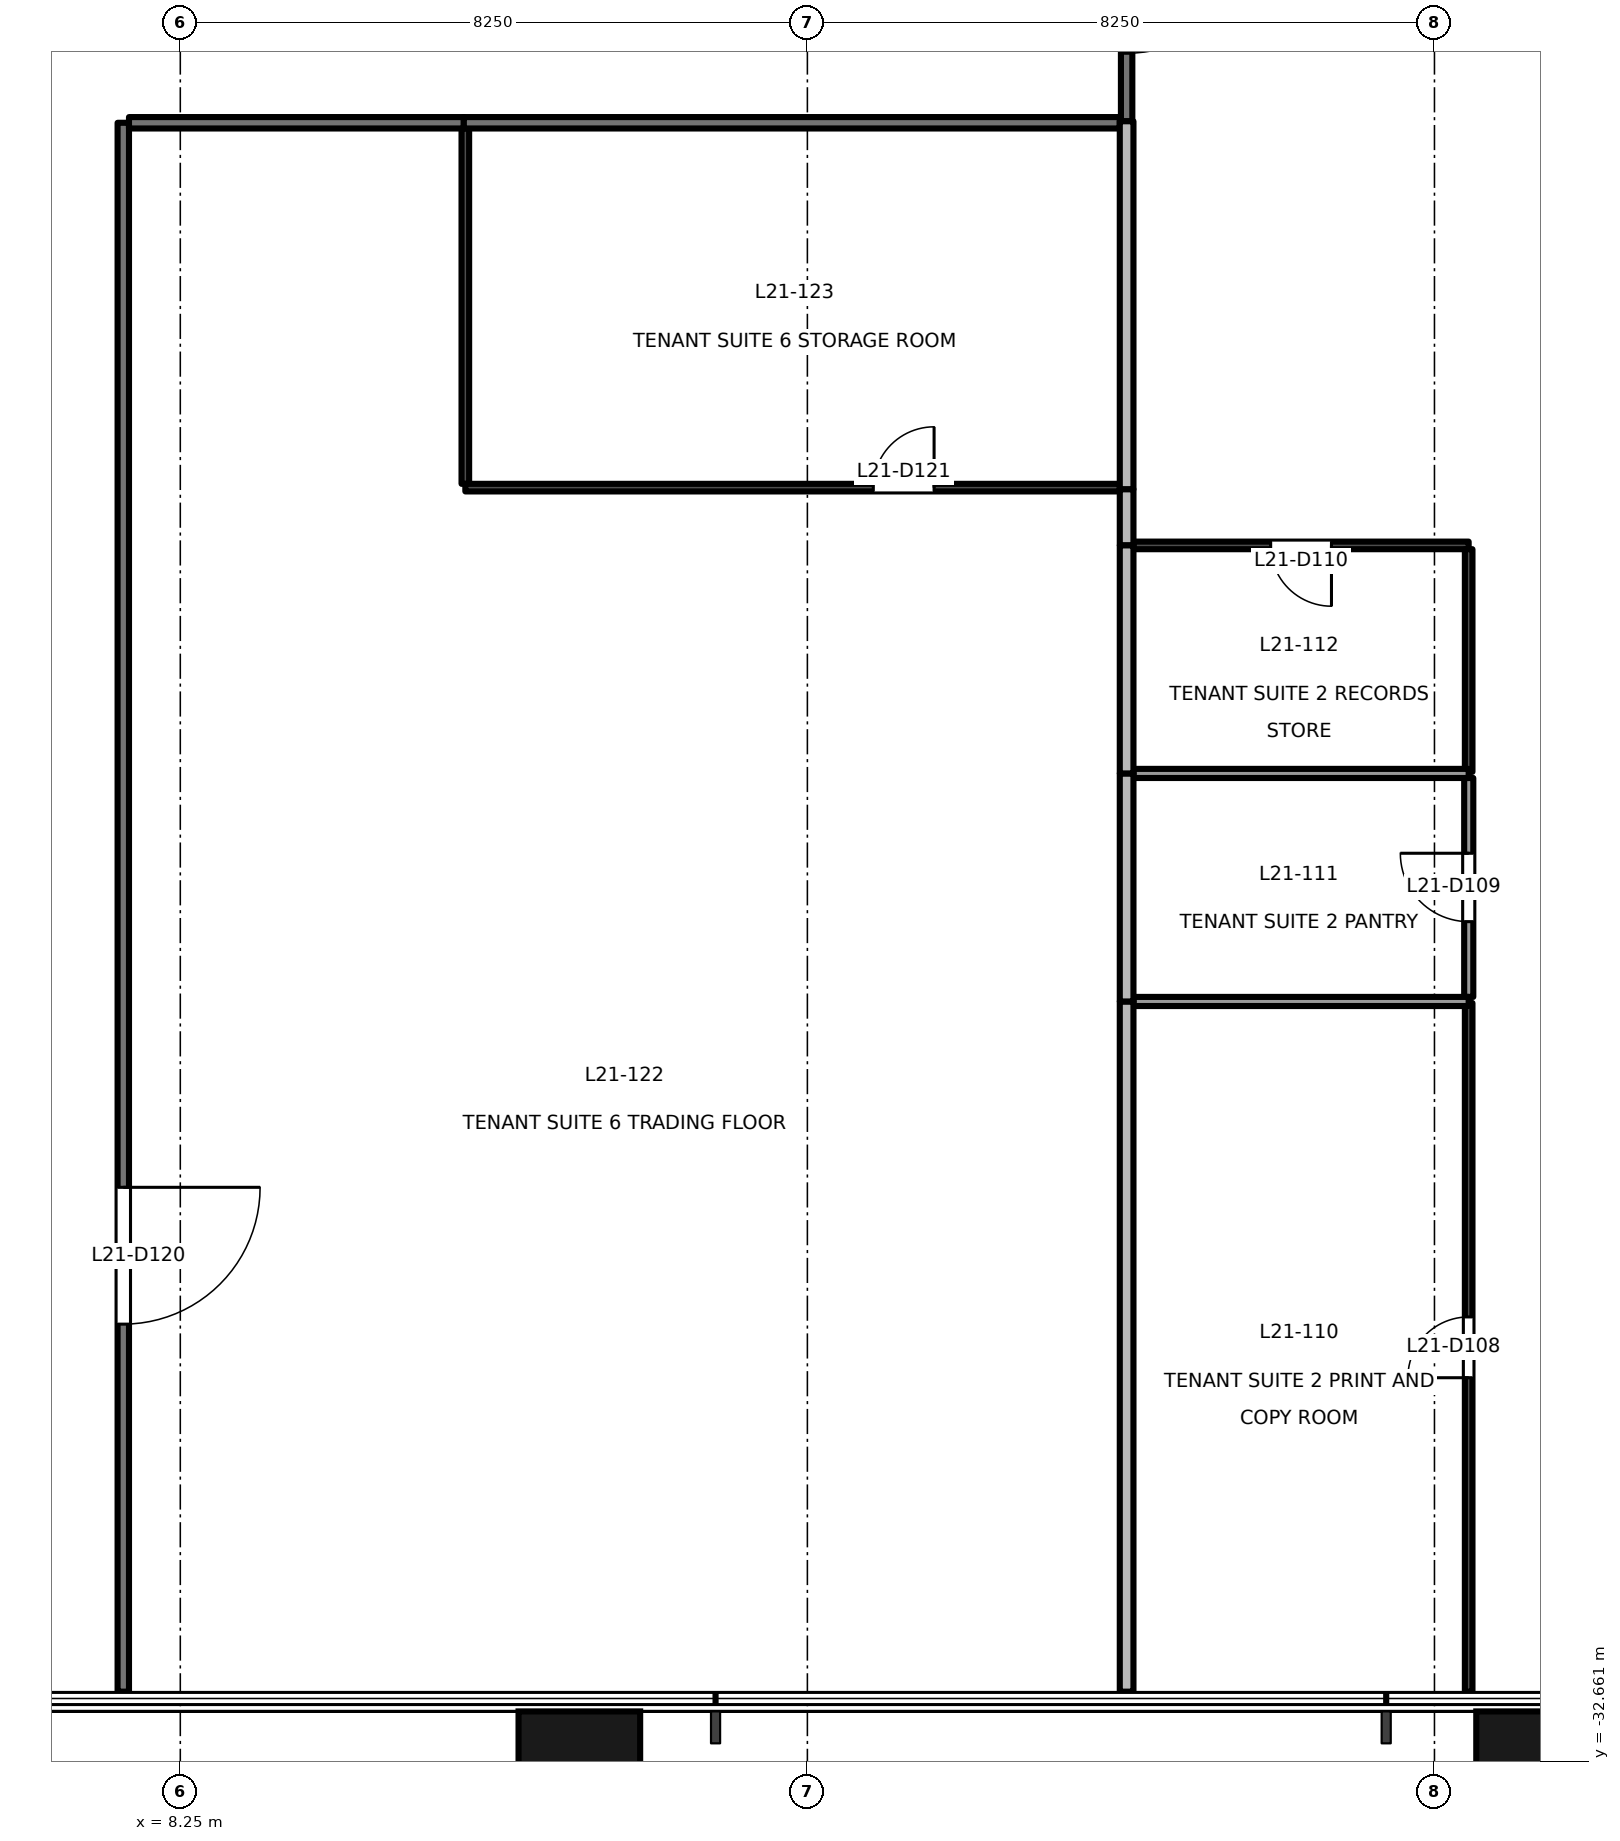
"""IFC4 building model, lengths in metres.
Left out: names, types, materials, properties, quantities, classifications, styles, units other than length and angle.
Written with IfcOpenShell. Run it as: python <this file> out.ifc"""

import sys

from ifc_helpers import new_model, si_unit, direction, frame, frame_2d, origin, origin_2d, place, context, subcontext, project, spatial, rectangle, extrude, element, fill, save


model = new_model("IFC4")
c1 = context("Model", 3, precision=1e-05, world=origin(), true_north=direction((0.0, 1.0)))
c2 = subcontext(c1, "Body", "Model", "MODEL_VIEW")
j1 = project(units=[si_unit("LENGTHUNIT", "METRE"), si_unit("PLANEANGLEUNIT", "RADIAN")], contexts=[c1])
p1 = place(None, origin())
s1 = spatial("IfcSite", under=j1, at=p1, CompositionType="ELEMENT")
p2 = place(p1, origin())
s2 = spatial("IfcBuilding", under=s1, at=p2, CompositionType="ELEMENT")
p3 = place(p2, frame((0.0, 0.0, 95.7)))
s3 = spatial("IfcBuildingStorey", under=s2, at=p3, CompositionType="ELEMENT", Elevation=95.7)
for number, where, z_axis, x_axis in (
    (1, (13.5, -32.9, -0.2), (0.0, 0.0, 1.0), (1.0, 0.0, 0.0)),
    (2, (26.1, -32.9, -0.2), (0.0, 0.0, 1.0), (1.0, 0.0, 0.0)),
):
    element("IfcColumn", number, at=place(p3, frame(where, z_axis=z_axis, x_axis=x_axis)), inside=s3, PredefinedType="COLUMN", context=c2, shape_type="SweptSolid", body=[
        extrude(rectangle(XDim=1.6, YDim=1.8, at=origin_2d()), origin(), (0.0, 0.0, 1.0), 4.0),
    ])
p4 = place(p3, frame((20.7, -7.49, 0.0), z_axis=(0.0, 0.0, 1.0), x_axis=(0.0, -1.0, 0.0)))
e3 = element("IfcWall", 3, at=p4, inside=s3, PredefinedType="PARTITIONING", context=c2, shape_type="SweptSolid", body=[
    extrude(rectangle(XDim=3.59, YDim=0.15, at=frame_2d((1.795, 0.0))), origin(), (0.0, 0.0, 1.0), 2.9),
])
p5 = place(p4, frame((0.895, 0.0, 0.0)))
e4 = element("IfcOpeningElement", 4, at=p5, cuts=e3, PredefinedType="OPENING", context=c2, shape_type="SweptSolid", body=[
    extrude(rectangle(XDim=1.8, YDim=2.1, at=frame_2d((0.9, 1.05))), frame((0.0, 0.085, 0.0), z_axis=(0.0, -1.0, 0.0), x_axis=(1.0, 0.0, 0.0)), (0.0, 0.0, 1.0), 0.171),
])
p6 = place(p3, frame((7.5, -11.1, 0.0), z_axis=(0.0, 0.0, 1.0), x_axis=(0.0, -1.0, 0.0)))
e5 = element("IfcWall", 5, at=p6, inside=s3, PredefinedType="PARTITIONING", context=c2, shape_type="SweptSolid", body=[
    extrude(rectangle(XDim=20.64, YDim=0.15, at=frame_2d((10.32, 0.0))), origin(), (0.0, 0.0, 1.0), 3.8),
])
p7 = place(p6, frame((14.005, 0.0, 0.0)))
e6 = element("IfcOpeningElement", 6, at=p7, cuts=e5, PredefinedType="OPENING", context=c2, shape_type="SweptSolid", body=[
    extrude(rectangle(XDim=1.8, YDim=2.1, at=frame_2d((0.9, 1.05))), frame((0.0, 0.085, 0.0), z_axis=(0.0, -1.0, 0.0), x_axis=(1.0, 0.0, 0.0)), (0.0, 0.0, 1.0), 0.171),
])
p8 = place(p3, frame((11.98, -11.1, 0.0), z_axis=(0.0, 0.0, 1.0), x_axis=(-1.0, 0.0, 0.0)))
e7 = element("IfcWall", 7, at=p8, inside=s3, PredefinedType="PARTITIONING", context=c2, shape_type="SweptSolid", body=[
    extrude(rectangle(XDim=4.405, YDim=0.15, at=frame_2d((2.203, 0.0))), origin(), (0.0, 0.0, 1.0), 2.8),
])
p9 = place(p3, frame((20.61, -11.1, 0.0), z_axis=(0.0, 0.0, 1.0), x_axis=(-1.0, 0.0, 0.0)))
e8 = element("IfcWall", 8, at=p9, inside=s3, PredefinedType="PARTITIONING", context=c2, shape_type="SweptSolid", body=[
    extrude(rectangle(XDim=8.63, YDim=0.15, at=frame_2d((4.315, 0.0))), origin(), (0.0, 0.0, 1.0), 2.4),
])
p10 = place(p3, frame((25.2, -31.74, 0.0), z_axis=(0.0, 0.0, 1.0), x_axis=(0.0, 1.0, 0.0)))
e9 = element("IfcWall", 9, at=p10, inside=s3, PredefinedType="PARTITIONING", context=c2, shape_type="SweptSolid", body=[
    extrude(rectangle(XDim=9.06, YDim=0.1, at=frame_2d((4.53, 0.0))), origin(), (0.0, 0.0, 1.0), 3.8),
])
p11 = place(p10, frame((4.13, 0.0, 0.0)))
e10 = element("IfcOpeningElement", 10, at=p11, cuts=e9, PredefinedType="OPENING", context=c2, shape_type="SweptSolid", body=[
    extrude(rectangle(XDim=0.8, YDim=2.1, at=frame_2d((0.4, 1.05))), frame((0.0, 0.061, 0.0), z_axis=(0.0, -1.0, 0.0), x_axis=(1.0, 0.0, 0.0)), (0.0, 0.0, 1.0), 0.121),
])
p12 = place(p3, frame((25.201, -22.6, 0.0), z_axis=(0.0, 0.0, 1.0), x_axis=(0.0, 1.0, 0.0)))
e11 = element("IfcWall", 11, at=p12, inside=s3, PredefinedType="PARTITIONING", context=c2, shape_type="SweptSolid", body=[
    extrude(rectangle(XDim=2.88, YDim=0.12, at=frame_2d((1.44, 0.0))), origin(), (0.0, 0.0, 1.0), 3.8),
])
p13 = place(p12, frame((0.99, 0.0, 0.0)))
e12 = element("IfcOpeningElement", 12, at=p13, cuts=e11, PredefinedType="OPENING", context=c2, shape_type="SweptSolid", body=[
    extrude(rectangle(XDim=0.9, YDim=2.1, at=frame_2d((0.45, 1.05))), frame((0.0, 0.071, 0.0), z_axis=(0.0, -1.0, 0.0), x_axis=(1.0, 0.0, 0.0)), (0.0, 0.0, 1.0), 0.141),
])
p14 = place(p3, frame((25.2, -16.66, 0.0), z_axis=(0.0, 0.0, 1.0), x_axis=(-1.0, 0.0, 0.0)))
e13 = element("IfcWall", 13, at=p14, inside=s3, PredefinedType="PARTITIONING", context=c2, shape_type="SweptSolid", body=[
    extrude(rectangle(XDim=4.41, YDim=0.1, at=frame_2d((2.205, 0.0))), origin(), (0.0, 0.0, 1.0), 3.8),
])
p15 = place(p14, frame((1.805, 0.0, 0.0)))
e14 = element("IfcOpeningElement", 14, at=p15, cuts=e13, PredefinedType="OPENING", context=c2, shape_type="SweptSolid", body=[
    extrude(rectangle(XDim=0.8, YDim=2.1, at=frame_2d((0.4, 1.05))), frame((0.0, 0.061, 0.0), z_axis=(0.0, -1.0, 0.0), x_axis=(1.0, 0.0, 0.0)), (0.0, 0.0, 1.0), 0.121),
])
p16 = place(p3, frame((25.2, -19.64, 0.0), z_axis=(0.0, 0.0, 1.0), x_axis=(0.0, 1.0, 0.0)))
e15 = element("IfcWall", 15, at=p16, inside=s3, PredefinedType="PARTITIONING", context=c2, shape_type="SweptSolid", body=[
    extrude(rectangle(XDim=2.93, YDim=0.1, at=frame_2d((1.465, 0.0))), origin(), (0.0, 0.0, 1.0), 3.8),
])
p17 = place(p3, frame((20.7, -16.66, 0.0), z_axis=(0.0, 0.0, 1.0), x_axis=(0.0, 1.0, 0.0)))
e16 = element("IfcWall", 16, at=p17, inside=s3, PredefinedType="PARTITIONING", context=c2, shape_type="SweptSolid", body=[
    extrude(rectangle(XDim=0.74, YDim=0.18, at=frame_2d((0.37, 0.0))), origin(), (0.0, 0.0, 1.0), 3.8),
])
p18 = place(p3, frame((20.7, -15.92, 0.0), z_axis=(0.0, 0.0, 1.0), x_axis=(0.0, 1.0, 0.0)))
e17 = element("IfcWall", 17, at=p18, inside=s3, PredefinedType="PARTITIONING", context=c2, shape_type="SweptSolid", body=[
    extrude(rectangle(XDim=4.84, YDim=0.18, at=frame_2d((2.42, 0.0))), origin(), (0.0, 0.0, 1.0), 2.9),
])
p19 = place(p3, frame((20.79, -22.66, 0.0), z_axis=(0.0, 0.0, 1.0), x_axis=(1.0, 0.0, 0.0)))
e18 = element("IfcWall", 18, at=p19, inside=s3, PredefinedType="PARTITIONING", context=c2, shape_type="SweptSolid", body=[
    extrude(rectangle(XDim=4.41, YDim=0.12, at=frame_2d((2.205, 0.0))), origin(), (0.0, 0.0, 1.0), 3.8),
])
p20 = place(p3, frame((20.7, -31.74, 0.0), z_axis=(0.0, 0.0, 1.0), x_axis=(0.0, 1.0, 0.0)))
e19 = element("IfcWall", 19, at=p20, inside=s3, PredefinedType="PARTITIONING", context=c2, shape_type="SweptSolid", body=[
    extrude(rectangle(XDim=9.08, YDim=0.18, at=frame_2d((4.54, 0.0))), origin(), (0.0, 0.0, 1.0), 3.8),
])
p21 = place(p3, frame((20.79, -19.66, 0.0), z_axis=(0.0, 0.0, 1.0), x_axis=(1.0, 0.0, 0.0)))
e20 = element("IfcWall", 20, at=p21, inside=s3, PredefinedType="PARTITIONING", context=c2, shape_type="SweptSolid", body=[
    extrude(rectangle(XDim=4.41, YDim=0.12, at=frame_2d((2.205, 0.0))), origin(), (0.0, 0.0, 1.0), 3.8),
])
for number, where, z_axis, x_axis in (
    (21, (20.7, -22.66, 0.0), (0.0, 0.0, 1.0), (0.0, 1.0, 0.0)),
    (22, (20.7, -19.66, 0.0), (0.0, 0.0, 1.0), (0.0, 1.0, 0.0)),
):
    element("IfcWall", number, at=place(p3, frame(where, z_axis=z_axis, x_axis=x_axis)), inside=s3, PredefinedType="PARTITIONING", context=c2, shape_type="SweptSolid", body=[
        extrude(rectangle(XDim=3.0, YDim=0.18, at=frame_2d((1.5, 0.0))), origin(), (0.0, 0.0, 1.0), 3.8),
    ])
p22 = place(p3, frame((12.0, -11.175, 0.0), z_axis=(0.0, 0.0, 1.0), x_axis=(0.0, -1.0, 0.0)))
e23 = element("IfcWall", 23, at=p22, inside=s3, PredefinedType="PARTITIONING", context=c2, shape_type="SweptSolid", body=[
    extrude(rectangle(XDim=4.675, YDim=0.1, at=frame_2d((2.337, 0.0))), origin(), (0.0, 0.0, 1.0), 3.8),
])
p23 = place(p3, frame((12.0, -15.9, 0.0), z_axis=(0.0, 0.0, 1.0), x_axis=(1.0, 0.0, 0.0)))
e24 = element("IfcWall", 24, at=p23, inside=s3, PredefinedType="PARTITIONING", context=c2, shape_type="SweptSolid", body=[
    extrude(rectangle(XDim=8.61, YDim=0.1, at=frame_2d((4.305, 0.0))), origin(), (0.0, 0.0, 1.0), 2.4),
])
p24 = place(p23, frame((5.367, 0.0, 0.0)))
e25 = element("IfcOpeningElement", 25, at=p24, cuts=e24, PredefinedType="OPENING", context=c2, shape_type="SweptSolid", body=[
    extrude(rectangle(XDim=0.8, YDim=2.1, at=frame_2d((0.4, 1.05))), frame((0.0, 0.061, 0.0), z_axis=(0.0, -1.0, 0.0), x_axis=(1.0, 0.0, 0.0)), (0.0, 0.0, 1.0), 0.121),
])
p25 = place(p5, origin())
e26 = element("IfcDoor", 26, at=p25, inside=s3, OperationType="DOUBLE_DOOR_SINGLE_SWING", PredefinedType="DOOR", context=c2, shape_type="SweptSolid", body=[
    extrude(rectangle(XDim=1.8, YDim=2.1, at=frame_2d((0.9, 1.05))), frame((0.0, 0.025, 0.0), z_axis=(0.0, -1.0, 0.0), x_axis=(1.0, 0.0, 0.0)), (0.0, 0.0, 1.0), 0.05),
])
fill(e4, e26)
p26 = place(p11, origin())
e27 = element("IfcDoor", 27, at=p26, inside=s3, OperationType="SINGLE_SWING_LEFT", PredefinedType="DOOR", context=c2, shape_type="SweptSolid", body=[
    extrude(rectangle(XDim=0.8, YDim=2.1, at=frame_2d((0.4, 1.05))), frame((0.0, 0.025, 0.0), z_axis=(0.0, -1.0, 0.0), x_axis=(1.0, 0.0, 0.0)), (0.0, 0.0, 1.0), 0.05),
])
fill(e10, e27)
p27 = place(p13, origin())
e28 = element("IfcDoor", 28, at=p27, inside=s3, OperationType="SINGLE_SWING_RIGHT", PredefinedType="DOOR", context=c2, shape_type="SweptSolid", body=[
    extrude(rectangle(XDim=0.9, YDim=2.1, at=frame_2d((0.45, 1.05))), frame((0.0, 0.025, 0.0), z_axis=(0.0, -1.0, 0.0), x_axis=(1.0, 0.0, 0.0)), (0.0, 0.0, 1.0), 0.05),
])
fill(e12, e28)
p28 = place(p15, origin())
e29 = element("IfcDoor", 29, at=p28, inside=s3, OperationType="SINGLE_SWING_LEFT", PredefinedType="DOOR", context=c2, shape_type="SweptSolid", body=[
    extrude(rectangle(XDim=0.8, YDim=2.1, at=frame_2d((0.4, 1.05))), frame((0.0, 0.025, 0.0), z_axis=(0.0, -1.0, 0.0), x_axis=(1.0, 0.0, 0.0)), (0.0, 0.0, 1.0), 0.05),
])
fill(e14, e29)
p29 = place(p7, origin())
e30 = element("IfcDoor", 30, at=p29, inside=s3, OperationType="DOUBLE_DOOR_SINGLE_SWING", PredefinedType="DOOR", context=c2, shape_type="SweptSolid", body=[
    extrude(rectangle(XDim=1.8, YDim=2.1, at=frame_2d((0.9, 1.05))), frame((0.0, 0.025, 0.0), z_axis=(0.0, -1.0, 0.0), x_axis=(1.0, 0.0, 0.0)), (0.0, 0.0, 1.0), 0.05),
])
fill(e6, e30)
p30 = place(p24, origin())
e31 = element("IfcDoor", 31, at=p30, inside=s3, OperationType="SINGLE_SWING_RIGHT", PredefinedType="DOOR", context=c2, shape_type="SweptSolid", body=[
    extrude(rectangle(XDim=0.8, YDim=2.1, at=frame_2d((0.4, 1.05))), frame((0.0, 0.025, 0.0), z_axis=(0.0, -1.0, 0.0), x_axis=(1.0, 0.0, 0.0)), (0.0, 0.0, 1.0), 0.05),
])
fill(e25, e31)
save(model, sys.argv[1])
